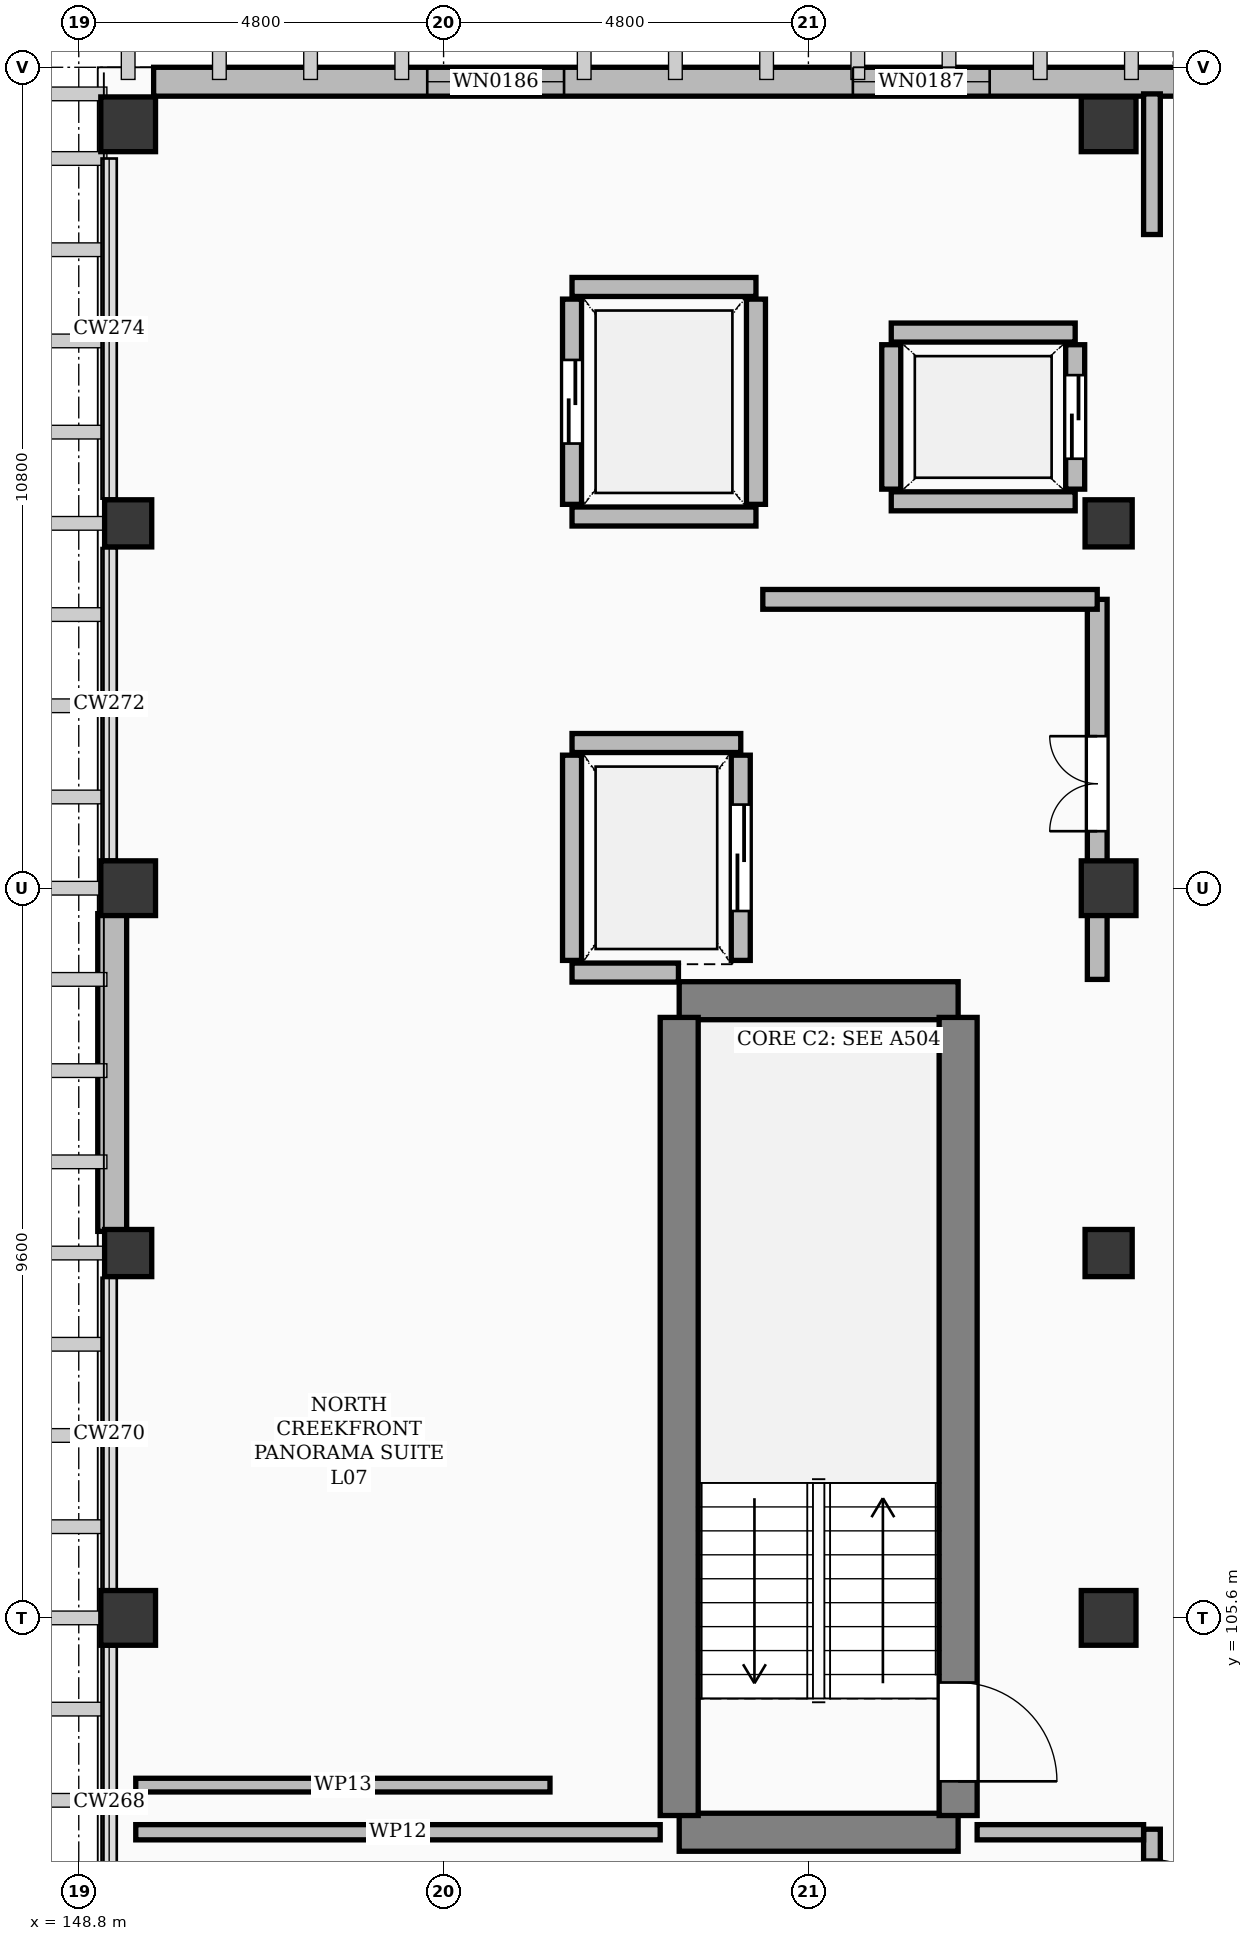
"""IFC4 building model, lengths in metres.
Left out: names, types, materials, properties, quantities, classifications, styles, units other than length and angle.
Written with IfcOpenShell. Run it as: python <this file> out.ifc"""

import sys

from ifc_helpers import new_model, si_unit, direction, frame, frame_2d, origin, origin_2d, place, context, subcontext, project, spatial, rectangle, extrude, element, fill, save


model = new_model("IFC4")
c1 = context("Model", 3, precision=1e-05, world=origin(), true_north=direction((0.0, 1.0)))
c2 = subcontext(c1, "Body", "Model", "MODEL_VIEW")
j1 = project(units=[si_unit("LENGTHUNIT", "METRE"), si_unit("PLANEANGLEUNIT", "RADIAN")], contexts=[c1])
p1 = place(None, origin())
s1 = spatial("IfcSite", under=j1, at=p1, CompositionType="ELEMENT")
p2 = place(p1, origin())
s2 = spatial("IfcBuilding", under=s1, at=p2, CompositionType="ELEMENT")
p3 = place(p2, frame((0.0, 0.0, 31.8)))
s3 = spatial("IfcBuildingStorey", under=s2, at=p3, CompositionType="ELEMENT", Elevation=31.8)
for number, where, z_axis, x_axis in (
    (1, (149.45, 105.6, 0.0), (0.0, 0.0, 1.0), (1.0, 0.0, 0.0)),
    (2, (149.45, 115.2, 0.0), (0.0, 0.0, 1.0), (1.0, 0.0, 0.0)),
    (3, (149.45, 125.25, 0.0), (0.0, 0.0, 1.0), (1.0, 0.0, 0.0)),
    (4, (162.35, 105.6, 0.0), (0.0, 0.0, 1.0), (1.0, 0.0, 0.0)),
    (5, (162.35, 115.2, 0.0), (0.0, 0.0, 1.0), (1.0, 0.0, 0.0)),
    (6, (162.35, 125.25, 0.0), (0.0, 0.0, 1.0), (1.0, 0.0, 0.0)),
):
    element("IfcColumn", number, at=place(p3, frame(where, z_axis=z_axis, x_axis=x_axis)), inside=s3, PredefinedType="COLUMN", context=c2, shape_type="SweptSolid", body=[
        extrude(rectangle(XDim=0.72, YDim=0.72, at=origin_2d()), origin(), (0.0, 0.0, 1.0), 3.6),
    ])
for number, where, z_axis, x_axis in (
    (7, (149.45, 110.4, 0.0), (0.0, 0.0, 1.0), (1.0, 0.0, 0.0)),
    (8, (149.45, 120.0, 0.0), (0.0, 0.0, 1.0), (1.0, 0.0, 0.0)),
    (9, (162.35, 110.4, 0.0), (0.0, 0.0, 1.0), (1.0, 0.0, 0.0)),
    (10, (162.35, 120.0, 0.0), (0.0, 0.0, 1.0), (1.0, 0.0, 0.0)),
):
    element("IfcColumn", number, at=place(p3, frame(where, z_axis=z_axis, x_axis=x_axis)), inside=s3, PredefinedType="COLUMN", context=c2, shape_type="SweptSolid", body=[
        extrude(rectangle(XDim=0.62, YDim=0.62, at=origin_2d()), origin(), (0.0, 0.0, 1.0), 3.6),
    ])
p4 = place(p3, frame((149.785, 125.81, 0.0), z_axis=(0.0, 0.0, 1.0), x_axis=(1.0, 0.0, 0.0)))
e11 = element("IfcWall", 11, at=p4, inside=s3, PredefinedType="SOLIDWALL", context=c2, shape_type="SweptSolid", body=[
    extrude(rectangle(XDim=29.23, YDim=0.38, at=frame_2d((14.615, 0.0))), origin(), (0.0, 0.0, 1.0), 3.36),
])
p5 = place(p4, frame((3.6, 0.0, 0.55)))
e12 = element("IfcOpeningElement", 12, at=p5, cuts=e11, PredefinedType="OPENING", context=c2, shape_type="SweptSolid", body=[
    extrude(rectangle(XDim=1.8, YDim=1.76, at=frame_2d((0.9, 0.88))), frame((0.0, 0.202, 0.0), z_axis=(0.0, -1.0, 0.0), x_axis=(1.0, 0.0, 0.0)), (0.0, 0.0, 1.0), 0.404),
])
p6 = place(p4, frame((9.2, 0.0, 0.55)))
e13 = element("IfcOpeningElement", 13, at=p6, cuts=e11, PredefinedType="OPENING", context=c2, shape_type="SweptSolid", body=[
    extrude(rectangle(XDim=1.8, YDim=1.76, at=frame_2d((0.9, 0.88))), frame((0.0, 0.202, 0.0), z_axis=(0.0, -1.0, 0.0), x_axis=(1.0, 0.0, 0.0)), (0.0, 0.0, 1.0), 0.404),
])
p7 = place(p4, frame((19.6, 0.0, 0.55)))
e14 = element("IfcOpeningElement", 14, at=p7, cuts=e11, PredefinedType="OPENING", context=c2, shape_type="SweptSolid", body=[
    extrude(rectangle(XDim=1.8, YDim=1.76, at=frame_2d((0.9, 0.88))), frame((0.0, 0.202, 0.0), z_axis=(0.0, -1.0, 0.0), x_axis=(1.0, 0.0, 0.0)), (0.0, 0.0, 1.0), 0.404),
])
p8 = place(p4, frame((25.2, 0.0, 0.55)))
e15 = element("IfcOpeningElement", 15, at=p8, cuts=e11, PredefinedType="OPENING", context=c2, shape_type="SweptSolid", body=[
    extrude(rectangle(XDim=1.8, YDim=1.76, at=frame_2d((0.9, 0.88))), frame((0.0, 0.202, 0.0), z_axis=(0.0, -1.0, 0.0), x_axis=(1.0, 0.0, 0.0)), (0.0, 0.0, 1.0), 0.404),
])
p9 = place(p3, frame((149.24, 110.685, 0.0), z_axis=(0.0, 0.0, 1.0), x_axis=(0.0, 1.0, 0.0)))
e16 = element("IfcWall", 16, at=p9, inside=s3, PredefinedType="SOLIDWALL", context=c2, shape_type="SweptSolid", body=[
    extrude(rectangle(XDim=4.18, YDim=0.38, at=frame_2d((2.09, 0.0))), origin(), (0.0, 0.0, 1.0), 2.732),
])
for number, where, z_axis, x_axis in (
    (17, (156.7, 102.78, 0.0), (0.0, 0.0, 1.0), (1.0, 0.0, 0.0)),
    (18, (156.7, 113.72, 0.0), (0.0, 0.0, 1.0), (1.0, 0.0, 0.0)),
):
    element("IfcWall", number, at=place(p3, frame(where, z_axis=z_axis, x_axis=x_axis)), inside=s3, PredefinedType="SHEAR", context=c2, shape_type="SweptSolid", body=[
        extrude(rectangle(XDim=3.67, YDim=0.5, at=frame_2d((1.835, 0.0))), origin(), (0.0, 0.0, 1.0), 3.36),
    ])
p10 = place(p3, frame((156.7, 103.0, 0.0), z_axis=(0.0, 0.0, 1.0), x_axis=(0.0, 1.0, 0.0)))
e19 = element("IfcWall", 19, at=p10, inside=s3, PredefinedType="SHEAR", context=c2, shape_type="SweptSolid", body=[
    extrude(rectangle(XDim=10.5, YDim=0.5, at=frame_2d((5.25, 0.0))), origin(), (0.0, 0.0, 1.0), 3.36),
])
p11 = place(p3, frame((160.37, 103.0, 0.0), z_axis=(0.0, 0.0, 1.0), x_axis=(0.0, 1.0, 0.0)))
e20 = element("IfcWall", 20, at=p11, inside=s3, PredefinedType="SHEAR", context=c2, shape_type="SweptSolid", body=[
    extrude(rectangle(XDim=10.5, YDim=0.5, at=frame_2d((5.25, 0.0))), origin(), (0.0, 0.0, 1.0), 3.36),
])
p12 = place(p11, frame((0.45, 0.0, 0.0)))
e21 = element("IfcOpeningElement", 21, at=p12, cuts=e20, PredefinedType="OPENING", context=c2, shape_type="SweptSolid", body=[
    extrude(rectangle(XDim=1.3, YDim=2.15, at=frame_2d((0.65, 1.075))), frame((0.0, 0.262, 0.0), z_axis=(0.0, -1.0, 0.0), x_axis=(1.0, 0.0, 0.0)), (0.0, 0.0, 1.0), 0.524),
])
p13 = place(p3, frame((155.29, 114.09, 0.0), z_axis=(0.0, 0.0, 1.0), x_axis=(1.0, 0.0, 0.0)))
e22 = element("IfcWall", 22, at=p13, inside=s3, PredefinedType="SOLIDWALL", context=c2, shape_type="SweptSolid", body=[
    extrude(rectangle(XDim=1.4, YDim=0.25, at=frame_2d((0.7, 0.0))), origin(), (0.0, 0.0, 1.0), 3.36),
])
p14 = place(p3, frame((155.29, 117.11, 0.0), z_axis=(0.0, 0.0, 1.0), x_axis=(1.0, 0.0, 0.0)))
e23 = element("IfcWall", 23, at=p14, inside=s3, PredefinedType="SOLIDWALL", context=c2, shape_type="SweptSolid", body=[
    extrude(rectangle(XDim=2.22, YDim=0.25, at=frame_2d((1.11, 0.0))), origin(), (0.0, 0.0, 1.0), 3.36),
])
p15 = place(p3, frame((155.29, 114.25, 0.0), z_axis=(0.0, 0.0, 1.0), x_axis=(0.0, 1.0, 0.0)))
e24 = element("IfcWall", 24, at=p15, inside=s3, PredefinedType="SOLIDWALL", context=c2, shape_type="SweptSolid", body=[
    extrude(rectangle(XDim=2.7, YDim=0.25, at=frame_2d((1.35, 0.0))), origin(), (0.0, 0.0, 1.0), 2.732),
])
p16 = place(p3, frame((157.51, 114.25, 0.0), z_axis=(0.0, 0.0, 1.0), x_axis=(0.0, 1.0, 0.0)))
e25 = element("IfcWall", 25, at=p16, inside=s3, PredefinedType="SOLIDWALL", context=c2, shape_type="SweptSolid", body=[
    extrude(rectangle(XDim=2.7, YDim=0.25, at=frame_2d((1.35, 0.0))), origin(), (0.0, 0.0, 1.0), 2.732),
])
p17 = place(p16, frame((0.65, 0.0, 0.0)))
e26 = element("IfcOpeningElement", 26, at=p17, cuts=e25, PredefinedType="OPENING", context=c2, shape_type="SweptSolid", body=[
    extrude(rectangle(XDim=1.4, YDim=2.3, at=frame_2d((0.7, 1.15))), frame((0.0, 0.137, 0.0), z_axis=(0.0, -1.0, 0.0), x_axis=(1.0, 0.0, 0.0)), (0.0, 0.0, 1.0), 0.274),
])
p18 = place(p3, frame((159.49, 120.29, 0.0), z_axis=(0.0, 0.0, 1.0), x_axis=(1.0, 0.0, 0.0)))
e27 = element("IfcWall", 27, at=p18, inside=s3, PredefinedType="SOLIDWALL", context=c2, shape_type="SweptSolid", body=[
    extrude(rectangle(XDim=2.42, YDim=0.25, at=frame_2d((1.21, 0.0))), origin(), (0.0, 0.0, 1.0), 2.732),
])
p19 = place(p3, frame((159.49, 122.51, 0.0), z_axis=(0.0, 0.0, 1.0), x_axis=(1.0, 0.0, 0.0)))
e28 = element("IfcWall", 28, at=p19, inside=s3, PredefinedType="SOLIDWALL", context=c2, shape_type="SweptSolid", body=[
    extrude(rectangle(XDim=2.42, YDim=0.25, at=frame_2d((1.21, 0.0))), origin(), (0.0, 0.0, 1.0), 3.36),
])
p20 = place(p3, frame((159.49, 120.45, 0.0), z_axis=(0.0, 0.0, 1.0), x_axis=(0.0, 1.0, 0.0)))
e29 = element("IfcWall", 29, at=p20, inside=s3, PredefinedType="SOLIDWALL", context=c2, shape_type="SweptSolid", body=[
    extrude(rectangle(XDim=1.9, YDim=0.25, at=frame_2d((0.95, 0.0))), origin(), (0.0, 0.0, 1.0), 3.36),
])
p21 = place(p3, frame((161.91, 120.45, 0.0), z_axis=(0.0, 0.0, 1.0), x_axis=(0.0, 1.0, 0.0)))
e30 = element("IfcWall", 30, at=p21, inside=s3, PredefinedType="SOLIDWALL", context=c2, shape_type="SweptSolid", body=[
    extrude(rectangle(XDim=1.9, YDim=0.25, at=frame_2d((0.95, 0.0))), origin(), (0.0, 0.0, 1.0), 3.36),
])
p22 = place(p21, frame((0.4, 0.0, 0.0)))
e31 = element("IfcOpeningElement", 31, at=p22, cuts=e30, PredefinedType="OPENING", context=c2, shape_type="SweptSolid", body=[
    extrude(rectangle(XDim=1.1, YDim=2.2, at=frame_2d((0.55, 1.1))), frame((0.0, 0.137, 0.0), z_axis=(0.0, -1.0, 0.0), x_axis=(1.0, 0.0, 0.0)), (0.0, 0.0, 1.0), 0.274),
])
p23 = place(p3, frame((155.29, 120.09, 0.0), z_axis=(0.0, 0.0, 1.0), x_axis=(1.0, 0.0, 0.0)))
e32 = element("IfcWall", 32, at=p23, inside=s3, PredefinedType="SOLIDWALL", context=c2, shape_type="SweptSolid", body=[
    extrude(rectangle(XDim=2.42, YDim=0.25, at=frame_2d((1.21, 0.0))), origin(), (0.0, 0.0, 1.0), 2.732),
])
p24 = place(p3, frame((155.29, 123.11, 0.0), z_axis=(0.0, 0.0, 1.0), x_axis=(1.0, 0.0, 0.0)))
e33 = element("IfcWall", 33, at=p24, inside=s3, PredefinedType="SOLIDWALL", context=c2, shape_type="SweptSolid", body=[
    extrude(rectangle(XDim=2.42, YDim=0.25, at=frame_2d((1.21, 0.0))), origin(), (0.0, 0.0, 1.0), 3.36),
])
p25 = place(p3, frame((155.29, 120.25, 0.0), z_axis=(0.0, 0.0, 1.0), x_axis=(0.0, 1.0, 0.0)))
e34 = element("IfcWall", 34, at=p25, inside=s3, PredefinedType="SOLIDWALL", context=c2, shape_type="SweptSolid", body=[
    extrude(rectangle(XDim=2.7, YDim=0.25, at=frame_2d((1.35, 0.0))), origin(), (0.0, 0.0, 1.0), 2.732),
])
p26 = place(p25, frame((0.8, 0.0, 0.0)))
e35 = element("IfcOpeningElement", 35, at=p26, cuts=e34, PredefinedType="OPENING", context=c2, shape_type="SweptSolid", body=[
    extrude(rectangle(XDim=1.1, YDim=2.2, at=frame_2d((0.55, 1.1))), frame((0.0, 0.137, 0.0), z_axis=(0.0, -1.0, 0.0), x_axis=(1.0, 0.0, 0.0)), (0.0, 0.0, 1.0), 0.274),
])
p27 = place(p3, frame((157.71, 120.25, 0.0), z_axis=(0.0, 0.0, 1.0), x_axis=(0.0, 1.0, 0.0)))
e36 = element("IfcWall", 36, at=p27, inside=s3, PredefinedType="SOLIDWALL", context=c2, shape_type="SweptSolid", body=[
    extrude(rectangle(XDim=2.7, YDim=0.25, at=frame_2d((1.35, 0.0))), origin(), (0.0, 0.0, 1.0), 2.732),
])
p28 = place(p3, frame((162.2, 114.0, 0.0), z_axis=(0.0, 0.0, 1.0), x_axis=(0.0, 1.0, 0.0)))
e37 = element("IfcWall", 37, at=p28, inside=s3, PredefinedType="SOLIDWALL", context=c2, shape_type="SweptSolid", body=[
    extrude(rectangle(XDim=5.0, YDim=0.26, at=frame_2d((2.5, 0.0))), origin(), (0.0, 0.0, 1.0), 2.732),
])
p29 = place(p28, frame((1.95, 0.0, 0.0)))
e38 = element("IfcOpeningElement", 38, at=p29, cuts=e37, PredefinedType="OPENING", context=c2, shape_type="SweptSolid", body=[
    extrude(rectangle(XDim=1.25, YDim=2.15, at=frame_2d((0.625, 1.075))), frame((0.0, 0.142, 0.0), z_axis=(0.0, -1.0, 0.0), x_axis=(1.0, 0.0, 0.0)), (0.0, 0.0, 1.0), 0.284),
])
p30 = place(p3, frame((157.8, 119.0, 0.0), z_axis=(0.0, 0.0, 1.0), x_axis=(1.0, 0.0, 0.0)))
e39 = element("IfcWall", 39, at=p30, inside=s3, PredefinedType="SOLIDWALL", context=c2, shape_type="SweptSolid", body=[
    extrude(rectangle(XDim=4.4, YDim=0.26, at=frame_2d((2.2, 0.0))), origin(), (0.0, 0.0, 1.0), 2.732),
])
p31 = place(p3, frame((162.92, 95.6, 0.0), z_axis=(0.0, 0.0, 1.0), x_axis=(0.0, 1.0, 0.0)))
e40 = element("IfcWall", 40, at=p31, inside=s3, PredefinedType="PARTITIONING", context=c2, shape_type="SweptSolid", body=[
    extrude(rectangle(XDim=7.22, YDim=0.22, at=frame_2d((3.61, 0.0))), origin(), (0.0, 0.0, 1.0), 2.732),
])
p32 = place(p31, frame((2.05, 0.0, 0.0)))
e41 = element("IfcOpeningElement", 41, at=p32, cuts=e40, PredefinedType="OPENING", context=c2, shape_type="SweptSolid", body=[
    extrude(rectangle(XDim=1.5, YDim=2.3, at=frame_2d((0.75, 1.15))), frame((0.0, 0.122, 0.0), z_axis=(0.0, -1.0, 0.0), x_axis=(1.0, 0.0, 0.0)), (0.0, 0.0, 1.0), 0.244),
])
p33 = place(p31, frame((5.8, 0.0, 0.0)))
e42 = element("IfcOpeningElement", 42, at=p33, cuts=e40, PredefinedType="OPENING", context=c2, shape_type="SweptSolid", body=[
    extrude(rectangle(XDim=1.02, YDim=2.2, at=frame_2d((0.51, 1.1))), frame((0.0, 0.122, 0.0), z_axis=(0.0, -1.0, 0.0), x_axis=(1.0, 0.0, 0.0)), (0.0, 0.0, 1.0), 0.244),
])
p34 = place(p3, frame((162.92, 123.8, 0.0), z_axis=(0.0, 0.0, 1.0), x_axis=(0.0, 1.0, 0.0)))
e43 = element("IfcWall", 43, at=p34, inside=s3, PredefinedType="PARTITIONING", context=c2, shape_type="SweptSolid", body=[
    extrude(rectangle(XDim=1.85, YDim=0.22, at=frame_2d((0.925, 0.0))), origin(), (0.0, 0.0, 1.0), 2.602),
])
p35 = place(p3, frame((149.55, 102.78, 0.0), z_axis=(0.0, 0.0, 1.0), x_axis=(1.0, 0.0, 0.0)))
e44 = element("IfcWall", 44, at=p35, inside=s3, PredefinedType="PARTITIONING", context=c2, shape_type="SweptSolid", body=[
    extrude(rectangle(XDim=6.9, YDim=0.2, at=frame_2d((3.45, 0.0))), origin(), (0.0, 0.0, 1.0), 2.732),
])
p36 = place(p3, frame((160.62, 102.78, 0.0), z_axis=(0.0, 0.0, 1.0), x_axis=(1.0, 0.0, 0.0)))
e45 = element("IfcWall", 45, at=p36, inside=s3, PredefinedType="PARTITIONING", context=c2, shape_type="SweptSolid", body=[
    extrude(rectangle(XDim=2.19, YDim=0.2, at=frame_2d((1.095, 0.0))), origin(), (0.0, 0.0, 1.0), 2.732),
])
p37 = place(p3, frame((149.55, 103.4, 0.0), z_axis=(0.0, 0.0, 1.0), x_axis=(1.0, 0.0, 0.0)))
e46 = element("IfcWall", 46, at=p37, inside=s3, PredefinedType="PARTITIONING", context=c2, shape_type="SweptSolid", body=[
    extrude(rectangle(XDim=5.45, YDim=0.18, at=frame_2d((2.725, 0.0))), origin(), (0.0, 0.0, 1.0), 2.732),
])
p38 = place(p5, origin())
e47 = element("IfcWindow", 47, at=p38, inside=s3, PartitioningType="SINGLE_PANEL", PredefinedType="WINDOW", context=c2, shape_type="SweptSolid", body=[
    extrude(rectangle(XDim=1.8, YDim=1.76, at=frame_2d((0.9, 0.88))), frame((0.0, 0.03, 0.0), z_axis=(0.0, -1.0, 0.0), x_axis=(1.0, 0.0, 0.0)), (0.0, 0.0, 1.0), 0.06),
])
fill(e12, e47)
p39 = place(p6, origin())
e48 = element("IfcWindow", 48, at=p39, inside=s3, PartitioningType="SINGLE_PANEL", PredefinedType="WINDOW", context=c2, shape_type="SweptSolid", body=[
    extrude(rectangle(XDim=1.8, YDim=1.76, at=frame_2d((0.9, 0.88))), frame((0.0, 0.03, 0.0), z_axis=(0.0, -1.0, 0.0), x_axis=(1.0, 0.0, 0.0)), (0.0, 0.0, 1.0), 0.06),
])
fill(e13, e48)
p40 = place(p12, frame((1.3, 0.0, 0.0), z_axis=(0.0, 0.0, 1.0), x_axis=(-1.0, 0.0, 0.0)))
e49 = element("IfcDoor", 49, at=p40, inside=s3, OperationType="SINGLE_SWING_LEFT", PredefinedType="DOOR", context=c2, shape_type="SweptSolid", body=[
    extrude(rectangle(XDim=1.3, YDim=2.15, at=frame_2d((0.65, 1.075))), frame((0.0, 0.025, 0.0), z_axis=(0.0, -1.0, 0.0), x_axis=(1.0, 0.0, 0.0)), (0.0, 0.0, 1.0), 0.05),
])
fill(e21, e49)
p41 = place(p17, origin())
e50 = element("IfcDoor", 50, at=p41, inside=s3, OperationType="SLIDING_TO_LEFT", PredefinedType="DOOR", context=c2, shape_type="SweptSolid", body=[
    extrude(rectangle(XDim=1.4, YDim=2.3, at=frame_2d((0.7, 1.15))), frame((0.0, 0.025, 0.0), z_axis=(0.0, -1.0, 0.0), x_axis=(1.0, 0.0, 0.0)), (0.0, 0.0, 1.0), 0.05),
])
fill(e26, e50)
p42 = place(p22, origin())
e51 = element("IfcDoor", 51, at=p42, inside=s3, OperationType="SLIDING_TO_LEFT", PredefinedType="DOOR", context=c2, shape_type="SweptSolid", body=[
    extrude(rectangle(XDim=1.1, YDim=2.2, at=frame_2d((0.55, 1.1))), frame((0.0, 0.025, 0.0), z_axis=(0.0, -1.0, 0.0), x_axis=(1.0, 0.0, 0.0)), (0.0, 0.0, 1.0), 0.05),
])
fill(e31, e51)
p43 = place(p26, origin())
e52 = element("IfcDoor", 52, at=p43, inside=s3, OperationType="SLIDING_TO_LEFT", PredefinedType="DOOR", context=c2, shape_type="SweptSolid", body=[
    extrude(rectangle(XDim=1.1, YDim=2.2, at=frame_2d((0.55, 1.1))), frame((0.0, 0.025, 0.0), z_axis=(0.0, -1.0, 0.0), x_axis=(1.0, 0.0, 0.0)), (0.0, 0.0, 1.0), 0.05),
])
fill(e35, e52)
p44 = place(p29, origin())
e53 = element("IfcDoor", 53, at=p44, inside=s3, OperationType="DOUBLE_DOOR_SINGLE_SWING", PredefinedType="DOOR", context=c2, shape_type="SweptSolid", body=[
    extrude(rectangle(XDim=1.25, YDim=2.15, at=frame_2d((0.625, 1.075))), frame((0.0, 0.025, 0.0), z_axis=(0.0, -1.0, 0.0), x_axis=(1.0, 0.0, 0.0)), (0.0, 0.0, 1.0), 0.05),
])
fill(e38, e53)
p45 = place(p33, frame((1.02, 0.0, 0.0), z_axis=(0.0, 0.0, 1.0), x_axis=(-1.0, 0.0, 0.0)))
e54 = element("IfcDoor", 54, at=p45, inside=s3, OperationType="SINGLE_SWING_LEFT", PredefinedType="DOOR", context=c2, shape_type="SweptSolid", body=[
    extrude(rectangle(XDim=1.02, YDim=2.2, at=frame_2d((0.51, 1.1))), frame((0.0, 0.025, 0.0), z_axis=(0.0, -1.0, 0.0), x_axis=(1.0, 0.0, 0.0)), (0.0, 0.0, 1.0), 0.05),
])
fill(e42, e54)
save(model, sys.argv[1])
